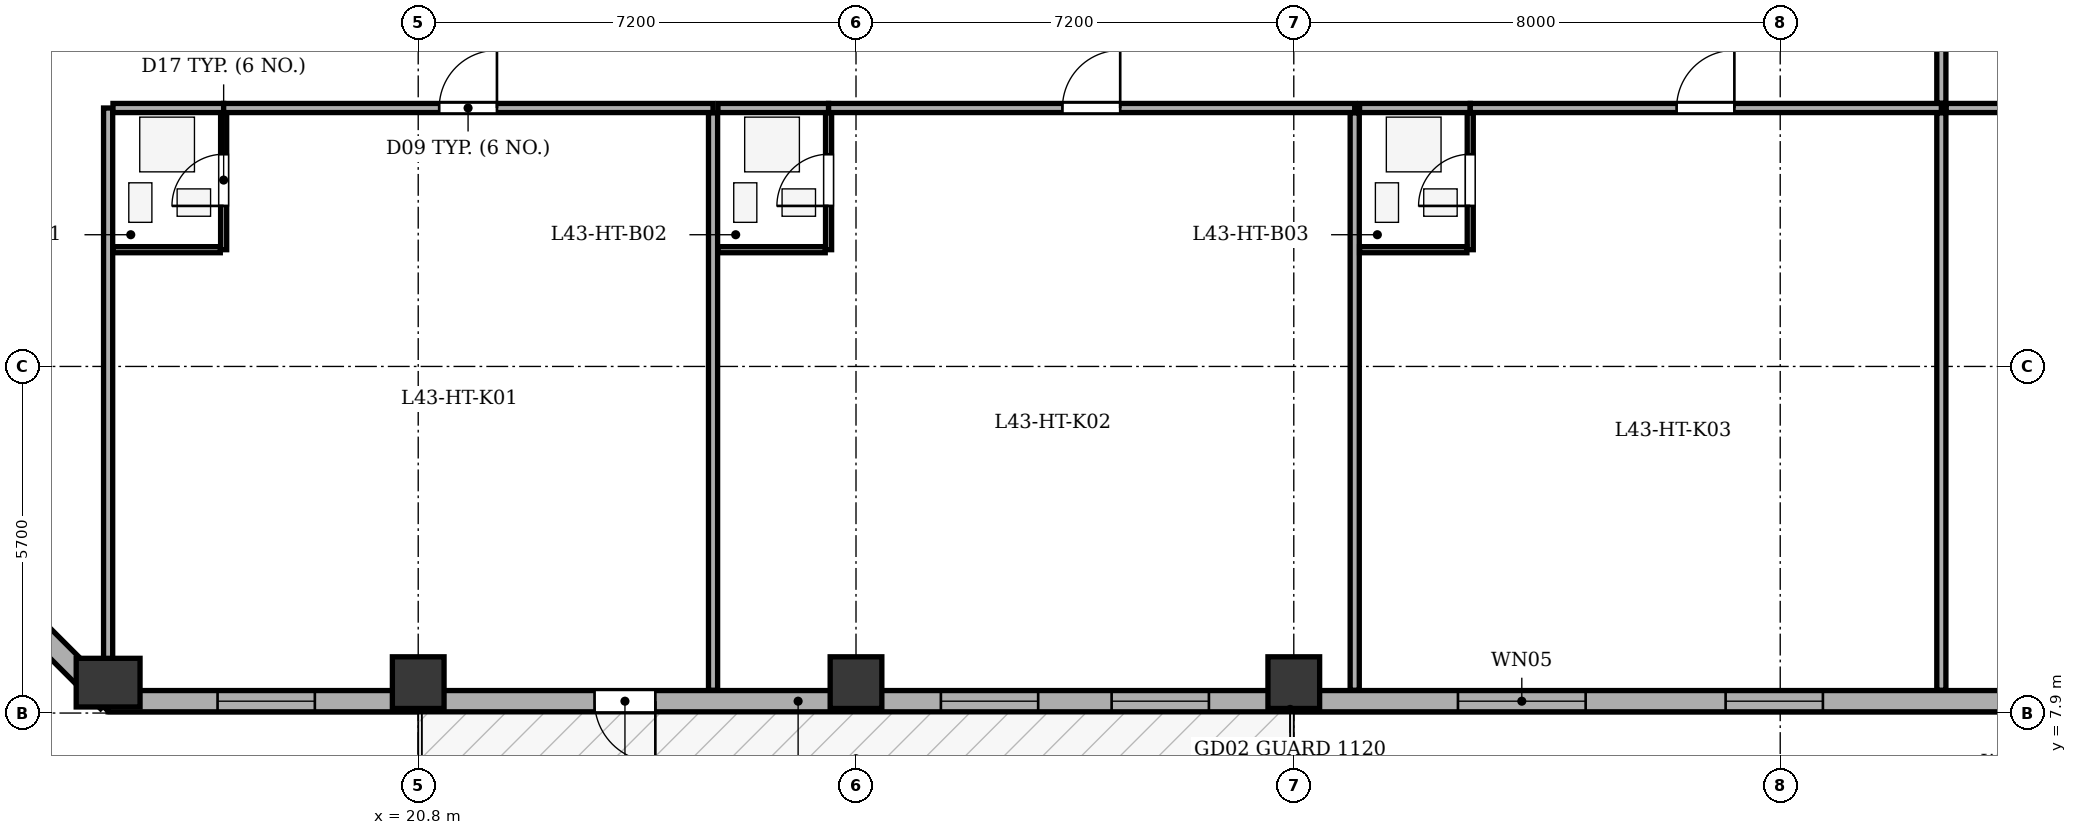
"""IFC4 building model, lengths in metres.
Left out: names, types, materials, properties, quantities, classifications, styles, units other than length and angle.
Written with IfcOpenShell. Run it as: python <this file> out.ifc"""

import sys

from ifc_helpers import new_model, si_unit, direction, frame, frame_2d, origin, origin_2d, place, context, subcontext, project, spatial, rectangle, extrude, element, fill, save


model = new_model("IFC4")
c1 = context("Model", 3, precision=1e-05, world=origin(), true_north=direction((0.0, 1.0)))
c2 = subcontext(c1, "Body", "Model", "MODEL_VIEW")
j1 = project(units=[si_unit("LENGTHUNIT", "METRE"), si_unit("PLANEANGLEUNIT", "RADIAN")], contexts=[c1])
p1 = place(None, origin())
s1 = spatial("IfcSite", under=j1, at=p1, CompositionType="ELEMENT")
p2 = place(p1, origin())
s2 = spatial("IfcBuilding", under=s1, at=p2, CompositionType="ELEMENT")
p3 = place(p2, frame((0.0, 0.0, 169.3)))
s3 = spatial("IfcBuildingStorey", under=s2, at=p3, CompositionType="ELEMENT", Elevation=169.3)
p4 = place(p3, frame((15.7, 8.4, 0.0), z_axis=(0.0, 0.0, 1.0), x_axis=(1.0, 0.0, 0.0)))
e1 = element("IfcColumn", 1, at=p4, inside=s3, PredefinedType="COLUMN", context=c2, shape_type="SweptSolid", body=[
    extrude(rectangle(XDim=0.8, YDim=1.05, at=origin_2d()), origin(), (0.0, 0.0, 1.0), 3.5),
])
for number, where, z_axis, x_axis in (
    (2, (20.8, 8.4, 0.0), (0.0, 0.0, 1.0), (1.0, 0.0, 0.0)),
    (3, (28.0, 8.4, 0.0), (0.0, 0.0, 1.0), (1.0, 0.0, 0.0)),
    (4, (35.2, 8.4, 0.0), (0.0, 0.0, 1.0), (1.0, 0.0, 0.0)),
):
    element("IfcColumn", number, at=place(p3, frame(where, z_axis=z_axis, x_axis=x_axis)), inside=s3, PredefinedType="COLUMN", context=c2, shape_type="SweptSolid", body=[
        extrude(rectangle(XDim=0.85, YDim=0.85, at=origin_2d()), origin(), (0.0, 0.0, 1.0), 3.5),
    ])
p5 = place(p3, frame((50.7, 8.095, 0.0), z_axis=(0.0, 0.0, 1.0), x_axis=(-1.0, 0.0, 0.0)))
e5 = element("IfcWall", 5, at=p5, inside=s3, PredefinedType="STANDARD", context=c2, shape_type="SweptSolid", body=[
    extrude(rectangle(XDim=35.0, YDim=0.35, at=frame_2d((17.5, 0.0))), origin(), (0.0, 0.0, 1.0), 2.785),
])
p6 = place(p5, frame((26.0, 0.0, 0.0)))
e6 = element("IfcOpeningElement", 6, at=p6, cuts=e5, PredefinedType="OPENING", context=c2, shape_type="SweptSolid", body=[
    extrude(rectangle(XDim=1.0, YDim=2.02, at=frame_2d((0.5, 1.01))), frame((0.0, 0.185, 0.0), z_axis=(0.0, -1.0, 0.0), x_axis=(1.0, 0.0, 0.0)), (0.0, 0.0, 1.0), 0.37),
])
p7 = place(p5, frame((1.763, 0.0, 0.75)))
e7 = element("IfcOpeningElement", 7, at=p7, cuts=e5, PredefinedType="OPENING", context=c2, shape_type="SweptSolid", body=[
    extrude(rectangle(XDim=1.6, YDim=1.75, at=frame_2d((0.8, 0.875))), frame((0.0, 0.185, 0.0), z_axis=(0.0, -1.0, 0.0), x_axis=(1.0, 0.0, 0.0)), (0.0, 0.0, 1.0), 0.37),
])
p8 = place(p5, frame((6.798, 0.0, 0.75)))
e8 = element("IfcOpeningElement", 8, at=p8, cuts=e5, PredefinedType="OPENING", context=c2, shape_type="SweptSolid", body=[
    extrude(rectangle(XDim=1.6, YDim=1.75, at=frame_2d((0.8, 0.875))), frame((0.0, 0.185, 0.0), z_axis=(0.0, -1.0, 0.0), x_axis=(1.0, 0.0, 0.0)), (0.0, 0.0, 1.0), 0.37),
])
p9 = place(p5, frame((10.7, 0.0, 0.75)))
e9 = element("IfcOpeningElement", 9, at=p9, cuts=e5, PredefinedType="OPENING", context=c2, shape_type="SweptSolid", body=[
    extrude(rectangle(XDim=2.1, YDim=1.75, at=frame_2d((1.05, 0.875))), frame((0.0, 0.185, 0.0), z_axis=(0.0, -1.0, 0.0), x_axis=(1.0, 0.0, 0.0)), (0.0, 0.0, 1.0), 0.37),
])
p10 = place(p5, frame((16.896, 0.0, 0.75)))
e10 = element("IfcOpeningElement", 10, at=p10, cuts=e5, PredefinedType="OPENING", context=c2, shape_type="SweptSolid", body=[
    extrude(rectangle(XDim=1.6, YDim=1.75, at=frame_2d((0.8, 0.875))), frame((0.0, 0.185, 0.0), z_axis=(0.0, -1.0, 0.0), x_axis=(1.0, 0.0, 0.0)), (0.0, 0.0, 1.0), 0.37),
])
p11 = place(p5, frame((19.704, 0.0, 0.75)))
e11 = element("IfcOpeningElement", 11, at=p11, cuts=e5, PredefinedType="OPENING", context=c2, shape_type="SweptSolid", body=[
    extrude(rectangle(XDim=1.6, YDim=1.75, at=frame_2d((0.8, 0.875))), frame((0.0, 0.185, 0.0), z_axis=(0.0, -1.0, 0.0), x_axis=(1.0, 0.0, 0.0)), (0.0, 0.0, 1.0), 0.37),
])
p12 = place(p5, frame((31.6, 0.0, 0.75)))
e12 = element("IfcOpeningElement", 12, at=p12, cuts=e5, PredefinedType="OPENING", context=c2, shape_type="SweptSolid", body=[
    extrude(rectangle(XDim=1.6, YDim=1.75, at=frame_2d((0.8, 0.875))), frame((0.0, 0.185, 0.0), z_axis=(0.0, -1.0, 0.0), x_axis=(1.0, 0.0, 0.0)), (0.0, 0.0, 1.0), 0.37),
])
p13 = place(p3, frame((15.7, 8.095, 0.0), z_axis=(0.0, 0.0, 1.0), x_axis=(-0.707106781187, 0.707106781187, 0.0)))
e13 = element("IfcWall", 13, at=p13, inside=s3, PredefinedType="STANDARD", context=c2, shape_type="SweptSolid", body=[
    extrude(rectangle(XDim=6.795, YDim=0.35, at=frame_2d((3.397, 0.0))), origin(), (0.0, 0.0, 1.0), 2.785),
])
p14 = place(p13, frame((2.698, 0.0, 0.75)))
e14 = element("IfcOpeningElement", 14, at=p14, cuts=e13, PredefinedType="OPENING", context=c2, shape_type="SweptSolid", body=[
    extrude(rectangle(XDim=1.4, YDim=1.65, at=frame_2d((0.7, 0.825))), frame((0.0, 0.185, 0.0), z_axis=(0.0, -1.0, 0.0), x_axis=(1.0, 0.0, 0.0)), (0.0, 0.0, 1.0), 0.37),
])
p15 = place(p3, frame((15.7, 8.275, 0.0), z_axis=(0.0, 0.0, 1.0), x_axis=(0.0, 1.0, 0.0)))
e15 = element("IfcWall", 15, at=p15, inside=s3, PredefinedType="PARTITIONING", context=c2, shape_type="SweptSolid", body=[
    extrude(rectangle(XDim=9.575, YDim=0.15, at=frame_2d((4.788, 0.0))), origin(), (0.0, 0.0, 1.0), 3.2),
])
p16 = place(p3, frame((15.78, 17.85, 0.0), z_axis=(0.0, 0.0, 1.0), x_axis=(1.0, 0.0, 0.0)))
e16 = element("IfcWall", 16, at=p16, inside=s3, PredefinedType="PARTITIONING", context=c2, shape_type="SweptSolid", body=[
    extrude(rectangle(XDim=1.82, YDim=0.15, at=frame_2d((0.91, 0.0))), origin(), (0.0, 0.0, 1.0), 3.2),
])
p17 = place(p3, frame((17.6, 17.85, 0.0), z_axis=(0.0, 0.0, 1.0), x_axis=(1.0, 0.0, 0.0)))
e17 = element("IfcWall", 17, at=p17, inside=s3, PredefinedType="PARTITIONING", context=c2, shape_type="SweptSolid", body=[
    extrude(rectangle(XDim=8.049, YDim=0.15, at=frame_2d((4.024, 0.0))), origin(), (0.0, 0.0, 1.0), 3.2),
])
p18 = place(p17, frame((3.545, 0.0, 0.0)))
e18 = element("IfcOpeningElement", 18, at=p18, cuts=e17, PredefinedType="OPENING", context=c2, shape_type="SweptSolid", body=[
    extrude(rectangle(XDim=0.95, YDim=2.1, at=frame_2d((0.475, 1.05))), frame((0.0, 0.085, 0.0), z_axis=(0.0, -1.0, 0.0), x_axis=(1.0, 0.0, 0.0)), (0.0, 0.0, 1.0), 0.17),
])
p19 = place(p3, frame((17.6, 15.52, 0.0), z_axis=(0.0, 0.0, 1.0), x_axis=(0.0, 1.0, 0.0)))
e19 = element("IfcWall", 19, at=p19, inside=s3, PredefinedType="PARTITIONING", context=c2, shape_type="SweptSolid", body=[
    extrude(rectangle(XDim=2.25, YDim=0.1, at=frame_2d((1.125, 0.0))), origin(), (0.0, 0.0, 1.0), 3.2),
])
p20 = place(p19, frame((0.72, 0.0, 0.0)))
e20 = element("IfcOpeningElement", 20, at=p20, cuts=e19, PredefinedType="OPENING", context=c2, shape_type="SweptSolid", body=[
    extrude(rectangle(XDim=0.85, YDim=2.05, at=frame_2d((0.425, 1.025))), frame((0.0, 0.06, 0.0), z_axis=(0.0, -1.0, 0.0), x_axis=(1.0, 0.0, 0.0)), (0.0, 0.0, 1.0), 0.12),
])
p21 = place(p3, frame((15.78, 15.52, 0.0), z_axis=(0.0, 0.0, 1.0), x_axis=(1.0, 0.0, 0.0)))
e21 = element("IfcWall", 21, at=p21, inside=s3, PredefinedType="PARTITIONING", context=c2, shape_type="SweptSolid", body=[
    extrude(rectangle(XDim=1.765, YDim=0.1, at=frame_2d((0.882, 0.0))), origin(), (0.0, 0.0, 1.0), 3.2),
])
p22 = place(p3, frame((25.649, 8.275, 0.0), z_axis=(0.0, 0.0, 1.0), x_axis=(0.0, 1.0, 0.0)))
e22 = element("IfcWall", 22, at=p22, inside=s3, PredefinedType="PARTITIONING", context=c2, shape_type="SweptSolid", body=[
    extrude(rectangle(XDim=9.495, YDim=0.15, at=frame_2d((4.748, 0.0))), origin(), (0.0, 0.0, 1.0), 3.2),
])
p23 = place(p3, frame((25.729, 17.85, 0.0), z_axis=(0.0, 0.0, 1.0), x_axis=(1.0, 0.0, 0.0)))
e23 = element("IfcWall", 23, at=p23, inside=s3, PredefinedType="PARTITIONING", context=c2, shape_type="SweptSolid", body=[
    extrude(rectangle(XDim=1.82, YDim=0.15, at=frame_2d((0.91, 0.0))), origin(), (0.0, 0.0, 1.0), 3.2),
])
p24 = place(p3, frame((27.549, 17.85, 0.0), z_axis=(0.0, 0.0, 1.0), x_axis=(1.0, 0.0, 0.0)))
e24 = element("IfcWall", 24, at=p24, inside=s3, PredefinedType="PARTITIONING", context=c2, shape_type="SweptSolid", body=[
    extrude(rectangle(XDim=8.653, YDim=0.15, at=frame_2d((4.326, 0.0))), origin(), (0.0, 0.0, 1.0), 3.2),
])
p25 = place(p24, frame((3.846, 0.0, 0.0)))
e25 = element("IfcOpeningElement", 25, at=p25, cuts=e24, PredefinedType="OPENING", context=c2, shape_type="SweptSolid", body=[
    extrude(rectangle(XDim=0.95, YDim=2.1, at=frame_2d((0.475, 1.05))), frame((0.0, 0.085, 0.0), z_axis=(0.0, -1.0, 0.0), x_axis=(1.0, 0.0, 0.0)), (0.0, 0.0, 1.0), 0.17),
])
p26 = place(p3, frame((27.549, 15.52, 0.0), z_axis=(0.0, 0.0, 1.0), x_axis=(0.0, 1.0, 0.0)))
e26 = element("IfcWall", 26, at=p26, inside=s3, PredefinedType="PARTITIONING", context=c2, shape_type="SweptSolid", body=[
    extrude(rectangle(XDim=2.25, YDim=0.1, at=frame_2d((1.125, 0.0))), origin(), (0.0, 0.0, 1.0), 3.2),
])
p27 = place(p26, frame((0.72, 0.0, 0.0)))
e27 = element("IfcOpeningElement", 27, at=p27, cuts=e26, PredefinedType="OPENING", context=c2, shape_type="SweptSolid", body=[
    extrude(rectangle(XDim=0.85, YDim=2.05, at=frame_2d((0.425, 1.025))), frame((0.0, 0.06, 0.0), z_axis=(0.0, -1.0, 0.0), x_axis=(1.0, 0.0, 0.0)), (0.0, 0.0, 1.0), 0.12),
])
p28 = place(p3, frame((25.729, 15.52, 0.0), z_axis=(0.0, 0.0, 1.0), x_axis=(1.0, 0.0, 0.0)))
e28 = element("IfcWall", 28, at=p28, inside=s3, PredefinedType="PARTITIONING", context=c2, shape_type="SweptSolid", body=[
    extrude(rectangle(XDim=1.765, YDim=0.1, at=frame_2d((0.882, 0.0))), origin(), (0.0, 0.0, 1.0), 3.2),
])
p29 = place(p3, frame((36.202, 8.275, 0.0), z_axis=(0.0, 0.0, 1.0), x_axis=(0.0, 1.0, 0.0)))
e29 = element("IfcWall", 29, at=p29, inside=s3, PredefinedType="PARTITIONING", context=c2, shape_type="SweptSolid", body=[
    extrude(rectangle(XDim=9.495, YDim=0.15, at=frame_2d((4.748, 0.0))), origin(), (0.0, 0.0, 1.0), 3.2),
])
p30 = place(p3, frame((36.282, 17.85, 0.0), z_axis=(0.0, 0.0, 1.0), x_axis=(1.0, 0.0, 0.0)))
e30 = element("IfcWall", 30, at=p30, inside=s3, PredefinedType="PARTITIONING", context=c2, shape_type="SweptSolid", body=[
    extrude(rectangle(XDim=1.82, YDim=0.15, at=frame_2d((0.91, 0.0))), origin(), (0.0, 0.0, 1.0), 3.2),
])
p31 = place(p3, frame((38.102, 17.85, 0.0), z_axis=(0.0, 0.0, 1.0), x_axis=(1.0, 0.0, 0.0)))
e31 = element("IfcWall", 31, at=p31, inside=s3, PredefinedType="PARTITIONING", context=c2, shape_type="SweptSolid", body=[
    extrude(rectangle(XDim=7.748, YDim=0.15, at=frame_2d((3.874, 0.0))), origin(), (0.0, 0.0, 1.0), 3.2),
])
p32 = place(p31, frame((3.394, 0.0, 0.0)))
e32 = element("IfcOpeningElement", 32, at=p32, cuts=e31, PredefinedType="OPENING", context=c2, shape_type="SweptSolid", body=[
    extrude(rectangle(XDim=0.95, YDim=2.1, at=frame_2d((0.475, 1.05))), frame((0.0, 0.085, 0.0), z_axis=(0.0, -1.0, 0.0), x_axis=(1.0, 0.0, 0.0)), (0.0, 0.0, 1.0), 0.17),
])
p33 = place(p3, frame((38.102, 15.52, 0.0), z_axis=(0.0, 0.0, 1.0), x_axis=(0.0, 1.0, 0.0)))
e33 = element("IfcWall", 33, at=p33, inside=s3, PredefinedType="PARTITIONING", context=c2, shape_type="SweptSolid", body=[
    extrude(rectangle(XDim=2.25, YDim=0.1, at=frame_2d((1.125, 0.0))), origin(), (0.0, 0.0, 1.0), 3.2),
])
p34 = place(p33, frame((0.72, 0.0, 0.0)))
e34 = element("IfcOpeningElement", 34, at=p34, cuts=e33, PredefinedType="OPENING", context=c2, shape_type="SweptSolid", body=[
    extrude(rectangle(XDim=0.85, YDim=2.05, at=frame_2d((0.425, 1.025))), frame((0.0, 0.06, 0.0), z_axis=(0.0, -1.0, 0.0), x_axis=(1.0, 0.0, 0.0)), (0.0, 0.0, 1.0), 0.12),
])
p35 = place(p3, frame((36.282, 15.52, 0.0), z_axis=(0.0, 0.0, 1.0), x_axis=(1.0, 0.0, 0.0)))
e35 = element("IfcWall", 35, at=p35, inside=s3, PredefinedType="PARTITIONING", context=c2, shape_type="SweptSolid", body=[
    extrude(rectangle(XDim=1.765, YDim=0.1, at=frame_2d((0.883, 0.0))), origin(), (0.0, 0.0, 1.0), 3.2),
])
p36 = place(p3, frame((45.85, 8.275, 0.0), z_axis=(0.0, 0.0, 1.0), x_axis=(0.0, 1.0, 0.0)))
e36 = element("IfcWall", 36, at=p36, inside=s3, PredefinedType="PARTITIONING", context=c2, shape_type="SweptSolid", body=[
    extrude(rectangle(XDim=9.495, YDim=0.15, at=frame_2d((4.748, 0.0))), origin(), (0.0, 0.0, 1.0), 3.2),
])
p37 = place(p3, frame((45.93, 17.85, 0.0), z_axis=(0.0, 0.0, 1.0), x_axis=(1.0, 0.0, 0.0)))
e37 = element("IfcWall", 37, at=p37, inside=s3, PredefinedType="PARTITIONING", context=c2, shape_type="SweptSolid", body=[
    extrude(rectangle(XDim=9.395, YDim=0.15, at=frame_2d((4.698, 0.0))), origin(), (0.0, 0.0, 1.0), 3.2),
])
p38 = place(p3, frame((45.85, 17.93, 0.0), z_axis=(0.0, 0.0, 1.0), x_axis=(0.0, 1.0, 0.0)))
e38 = element("IfcWall", 38, at=p38, inside=s3, PredefinedType="PARTITIONING", context=c2, shape_type="SweptSolid", body=[
    extrude(rectangle(XDim=18.54, YDim=0.15, at=frame_2d((9.27, 0.0))), origin(), (0.0, 0.0, 1.0), 3.2),
])
p39 = place(p38, frame((8.79, 0.0, 0.0)))
e39 = element("IfcOpeningElement", 39, at=p39, cuts=e38, PredefinedType="OPENING", context=c2, shape_type="SweptSolid", body=[
    extrude(rectangle(XDim=0.95, YDim=2.1, at=frame_2d((0.475, 1.05))), frame((0.0, 0.085, 0.0), z_axis=(0.0, -1.0, 0.0), x_axis=(1.0, 0.0, 0.0)), (0.0, 0.0, 1.0), 0.17),
])
p40 = place(p6, origin())
e40 = element("IfcDoor", 40, at=p40, inside=s3, OperationType="SINGLE_SWING_LEFT", PredefinedType="DOOR", context=c2, shape_type="SweptSolid", body=[
    extrude(rectangle(XDim=1.0, YDim=2.02, at=frame_2d((0.5, 1.01))), frame((0.0, 0.025, 0.0), z_axis=(0.0, -1.0, 0.0), x_axis=(1.0, 0.0, 0.0)), (0.0, 0.0, 1.0), 0.05),
])
fill(e6, e40)
p41 = place(p8, origin())
e41 = element("IfcWindow", 41, at=p41, inside=s3, PartitioningType="SINGLE_PANEL", PredefinedType="WINDOW", context=c2, shape_type="SweptSolid", body=[
    extrude(rectangle(XDim=1.6, YDim=1.75, at=frame_2d((0.8, 0.875))), frame((0.0, -0.01, 0.0), z_axis=(0.0, -1.0, 0.0), x_axis=(1.0, 0.0, 0.0)), (0.0, 0.0, 1.0), 0.06),
])
fill(e8, e41)
p42 = place(p9, origin())
e42 = element("IfcWindow", 42, at=p42, inside=s3, PartitioningType="SINGLE_PANEL", PredefinedType="WINDOW", context=c2, shape_type="SweptSolid", body=[
    extrude(rectangle(XDim=2.1, YDim=1.75, at=frame_2d((1.05, 0.875))), frame((0.0, -0.01, 0.0), z_axis=(0.0, -1.0, 0.0), x_axis=(1.0, 0.0, 0.0)), (0.0, 0.0, 1.0), 0.06),
])
fill(e9, e42)
p43 = place(p10, origin())
e43 = element("IfcWindow", 43, at=p43, inside=s3, PartitioningType="SINGLE_PANEL", PredefinedType="WINDOW", context=c2, shape_type="SweptSolid", body=[
    extrude(rectangle(XDim=1.6, YDim=1.75, at=frame_2d((0.8, 0.875))), frame((0.0, -0.01, 0.0), z_axis=(0.0, -1.0, 0.0), x_axis=(1.0, 0.0, 0.0)), (0.0, 0.0, 1.0), 0.06),
])
fill(e10, e43)
p44 = place(p11, origin())
e44 = element("IfcWindow", 44, at=p44, inside=s3, PartitioningType="SINGLE_PANEL", PredefinedType="WINDOW", context=c2, shape_type="SweptSolid", body=[
    extrude(rectangle(XDim=1.6, YDim=1.75, at=frame_2d((0.8, 0.875))), frame((0.0, -0.01, 0.0), z_axis=(0.0, -1.0, 0.0), x_axis=(1.0, 0.0, 0.0)), (0.0, 0.0, 1.0), 0.06),
])
fill(e11, e44)
p45 = place(p12, origin())
e45 = element("IfcWindow", 45, at=p45, inside=s3, PartitioningType="SINGLE_PANEL", PredefinedType="WINDOW", context=c2, shape_type="SweptSolid", body=[
    extrude(rectangle(XDim=1.6, YDim=1.75, at=frame_2d((0.8, 0.875))), frame((0.0, -0.01, 0.0), z_axis=(0.0, -1.0, 0.0), x_axis=(1.0, 0.0, 0.0)), (0.0, 0.0, 1.0), 0.06),
])
fill(e12, e45)
p46 = place(p20, origin())
e46 = element("IfcDoor", 46, at=p46, inside=s3, OperationType="SINGLE_SWING_LEFT", PredefinedType="DOOR", context=c2, shape_type="SweptSolid", body=[
    extrude(rectangle(XDim=0.85, YDim=2.05, at=frame_2d((0.425, 1.025))), frame((0.0, 0.025, 0.0), z_axis=(0.0, -1.0, 0.0), x_axis=(1.0, 0.0, 0.0)), (0.0, 0.0, 1.0), 0.05),
])
fill(e20, e46)
p47 = place(p18, origin())
e47 = element("IfcDoor", 47, at=p47, inside=s3, OperationType="SINGLE_SWING_RIGHT", PredefinedType="DOOR", context=c2, shape_type="SweptSolid", body=[
    extrude(rectangle(XDim=0.95, YDim=2.1, at=frame_2d((0.475, 1.05))), frame((0.0, 0.025, 0.0), z_axis=(0.0, -1.0, 0.0), x_axis=(1.0, 0.0, 0.0)), (0.0, 0.0, 1.0), 0.05),
])
fill(e18, e47)
p48 = place(p27, origin())
e48 = element("IfcDoor", 48, at=p48, inside=s3, OperationType="SINGLE_SWING_LEFT", PredefinedType="DOOR", context=c2, shape_type="SweptSolid", body=[
    extrude(rectangle(XDim=0.85, YDim=2.05, at=frame_2d((0.425, 1.025))), frame((0.0, 0.025, 0.0), z_axis=(0.0, -1.0, 0.0), x_axis=(1.0, 0.0, 0.0)), (0.0, 0.0, 1.0), 0.05),
])
fill(e27, e48)
p49 = place(p25, origin())
e49 = element("IfcDoor", 49, at=p49, inside=s3, OperationType="SINGLE_SWING_RIGHT", PredefinedType="DOOR", context=c2, shape_type="SweptSolid", body=[
    extrude(rectangle(XDim=0.95, YDim=2.1, at=frame_2d((0.475, 1.05))), frame((0.0, 0.025, 0.0), z_axis=(0.0, -1.0, 0.0), x_axis=(1.0, 0.0, 0.0)), (0.0, 0.0, 1.0), 0.05),
])
fill(e25, e49)
p50 = place(p34, origin())
e50 = element("IfcDoor", 50, at=p50, inside=s3, OperationType="SINGLE_SWING_LEFT", PredefinedType="DOOR", context=c2, shape_type="SweptSolid", body=[
    extrude(rectangle(XDim=0.85, YDim=2.05, at=frame_2d((0.425, 1.025))), frame((0.0, 0.025, 0.0), z_axis=(0.0, -1.0, 0.0), x_axis=(1.0, 0.0, 0.0)), (0.0, 0.0, 1.0), 0.05),
])
fill(e34, e50)
p51 = place(p32, origin())
e51 = element("IfcDoor", 51, at=p51, inside=s3, OperationType="SINGLE_SWING_RIGHT", PredefinedType="DOOR", context=c2, shape_type="SweptSolid", body=[
    extrude(rectangle(XDim=0.95, YDim=2.1, at=frame_2d((0.475, 1.05))), frame((0.0, 0.025, 0.0), z_axis=(0.0, -1.0, 0.0), x_axis=(1.0, 0.0, 0.0)), (0.0, 0.0, 1.0), 0.05),
])
fill(e32, e51)
save(model, sys.argv[1])
